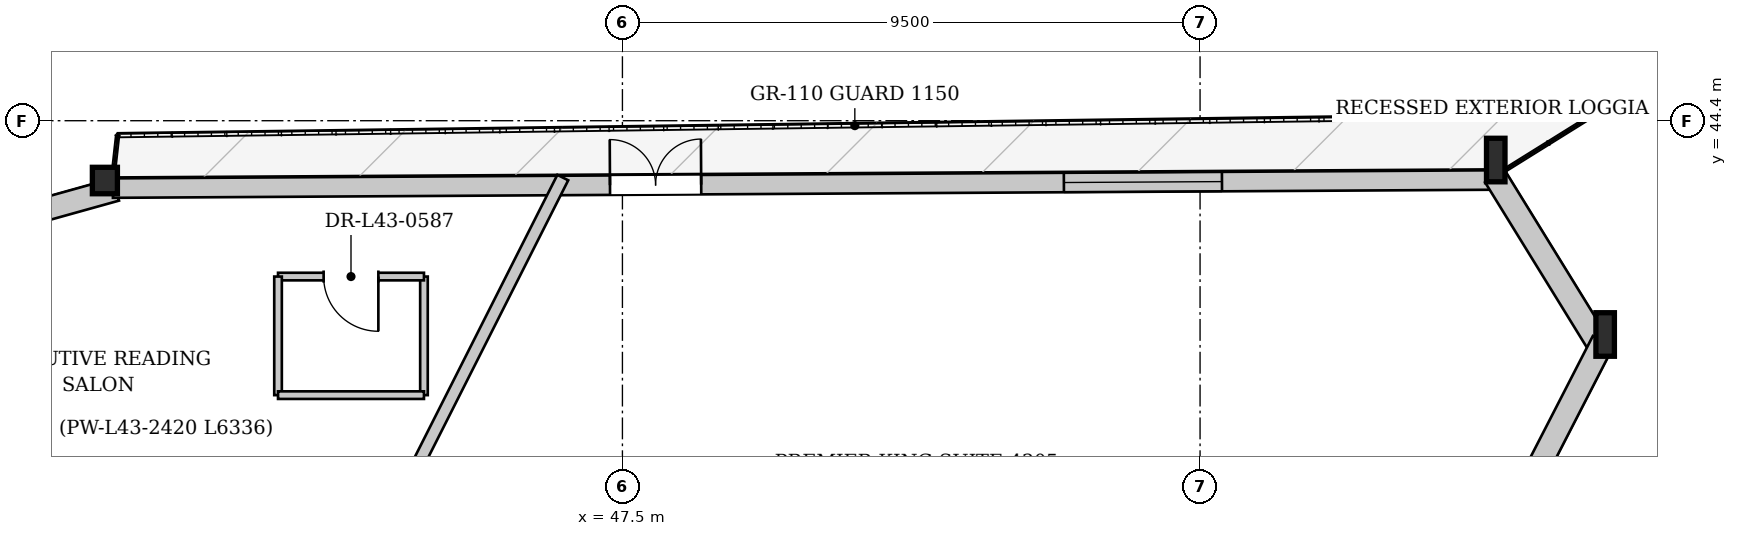
"""IFC4 building model, lengths in metres.
Left out: names, types, materials, properties, quantities, classifications, styles, units other than length and angle.
Written with IfcOpenShell. Run it as: python <this file> out.ifc"""

import sys

from ifc_helpers import new_model, si_unit, direction, frame, frame_2d, origin, origin_2d, place, context, subcontext, project, spatial, rectangle, i_section, extrude, source, transform, mapped, element, fill, save


model = new_model("IFC4")
c1 = context("Model", 3, precision=1e-05, world=origin(), true_north=direction((0.0, 1.0)))
c2 = subcontext(c1, "Body", "Model", "MODEL_VIEW")
j1 = project(units=[si_unit("LENGTHUNIT", "METRE"), si_unit("PLANEANGLEUNIT", "RADIAN")], contexts=[c1])
p1 = place(None, origin())
s1 = spatial("IfcSite", under=j1, at=p1, CompositionType="ELEMENT")
p2 = place(p1, origin())
s2 = spatial("IfcBuilding", under=s1, at=p2, CompositionType="ELEMENT")
p3 = place(p2, frame((0.0, 0.0, 164.35)))
s3 = spatial("IfcBuildingStorey", under=s2, at=p3, CompositionType="ELEMENT", Elevation=164.35)
m1 = source(origin(), c2, "Body", "SweptSolid", [
    extrude(i_section(OverallWidth=0.304, OverallDepth=0.716, WebThickness=0.021, FlangeThickness=0.04, at=origin_2d()), origin(), (0.0, 0.0, 1.0), 3.419),
])
p4 = place(p3, frame((63.798, 40.687, 0.0), z_axis=(-0.079478787874, 0.115754820435, 0.990092896563), x_axis=(-0.824383065971, -0.566032296376, 0.0)))
e1 = element("IfcColumn", 1, at=p4, inside=s3, PredefinedType="COLUMN", context=c2, shape_type="MappedRepresentation", body=[
    mapped(m1, transform((0.0, 0.0, 0.0), x_axis=(1.0, 0.0, 0.0), y_axis=(0.0, 1.0, 0.0), z_axis=(0.0, 0.0, 1.0), scale=1.0)),
])
m2 = source(origin(), c2, "Body", "SweptSolid", [
    extrude(i_section(OverallWidth=0.304, OverallDepth=0.716, WebThickness=0.021, FlangeThickness=0.04, at=origin_2d()), origin(), (0.0, 0.0, 1.0), 3.415),
])
p5 = place(p3, frame((62.011, 43.586, 0.0), z_axis=(-0.086804146839, 0.098101556395, 0.991383439807), x_axis=(-0.748913206075, -0.662668099253, 0.0)))
e2 = element("IfcColumn", 2, at=p5, inside=s3, PredefinedType="COLUMN", context=c2, shape_type="MappedRepresentation", body=[
    mapped(m2, transform((0.0, 0.0, 0.0), x_axis=(1.0, 0.0, 0.0), y_axis=(0.0, 1.0, 0.0), z_axis=(0.0, 0.0, 1.0), scale=1.0)),
])
m3 = source(origin(), c2, "Body", "SweptSolid", [
    extrude(i_section(OverallWidth=0.412, OverallDepth=0.435, WebThickness=0.031, FlangeThickness=0.05, at=origin_2d()), origin(), (0.0, 0.0, 1.0), 3.396),
])
p6 = place(p3, frame((39.119, 43.452, 0.0), z_axis=(-0.076712698826, -0.020921645134, 0.996833710608), x_axis=(0.263117405792, -0.964763821238, 0.0)))
e3 = element("IfcColumn", 3, at=p6, inside=s3, PredefinedType="COLUMN", context=c2, shape_type="MappedRepresentation", body=[
    mapped(m3, transform((0.0, 0.0, 0.0), x_axis=(1.0, 0.0, 0.0), y_axis=(0.0, 1.0, 0.0), z_axis=(0.0, 0.0, 1.0), scale=1.0)),
])
p7 = place(p3, frame((17.117, 37.123, 0.0), z_axis=(0.0, 0.0, 1.0), x_axis=(0.963294352917, 0.268447368468, 0.0)))
e4 = element("IfcWall", 4, at=p7, inside=s3, PredefinedType="SOLIDWALL", context=c2, shape_type="SweptSolid", body=[
    extrude(rectangle(XDim=22.893, YDim=0.38, at=frame_2d((11.446, 0.0))), origin(), (0.0, 0.0, 1.0), 2.722),
])
p8 = place(p7, frame((5.31, 0.0, 0.352)))
e5 = element("IfcOpeningElement", 5, at=p8, cuts=e4, PredefinedType="OPENING", context=c2, shape_type="SweptSolid", body=[
    extrude(rectangle(XDim=2.2, YDim=2.25, at=frame_2d((1.1, 1.125))), frame((0.0, 0.2, 0.0), z_axis=(0.0, -1.0, 0.0), x_axis=(1.0, 0.0, 0.0)), (0.0, 0.0, 1.0), 0.4),
])
p9 = place(p7, frame((15.383, 0.0, 0.352)))
e6 = element("IfcOpeningElement", 6, at=p9, cuts=e4, PredefinedType="OPENING", context=c2, shape_type="SweptSolid", body=[
    extrude(rectangle(XDim=2.2, YDim=2.25, at=frame_2d((1.1, 1.125))), frame((0.0, 0.2, 0.0), z_axis=(0.0, -1.0, 0.0), x_axis=(1.0, 0.0, 0.0)), (0.0, 0.0, 1.0), 0.4),
])
p10 = place(p3, frame((39.12, 43.292, 0.0), z_axis=(0.0, 0.0, 1.0), x_axis=(0.999982860289, 0.005854837953, 0.0)))
e7 = element("IfcWall", 7, at=p10, inside=s3, PredefinedType="SOLIDWALL", context=c2, shape_type="SweptSolid", body=[
    extrude(rectangle(XDim=22.893, YDim=0.32, at=frame_2d((11.446, 0.0))), origin(), (0.0, 0.0, 1.0), 2.722),
])
p11 = place(p10, frame((8.176, 0.0, 0.0)))
e8 = element("IfcOpeningElement", 8, at=p11, cuts=e7, PredefinedType="OPENING", context=c2, shape_type="SweptSolid", body=[
    extrude(rectangle(XDim=1.5, YDim=2.3, at=frame_2d((0.75, 1.15))), frame((0.0, 0.17, 0.0), z_axis=(0.0, -1.0, 0.0), x_axis=(1.0, 0.0, 0.0)), (0.0, 0.0, 1.0), 0.34),
])
p12 = place(p10, frame((15.641, 0.0, 0.252)))
e9 = element("IfcOpeningElement", 9, at=p12, cuts=e7, PredefinedType="OPENING", context=c2, shape_type="SweptSolid", body=[
    extrude(rectangle(XDim=2.6, YDim=2.35, at=frame_2d((1.3, 1.175))), frame((0.0, 0.17, 0.0), z_axis=(0.0, -1.0, 0.0), x_axis=(1.0, 0.0, 0.0)), (0.0, 0.0, 1.0), 0.34),
])
p13 = place(p3, frame((61.849, 43.486, 0.0), z_axis=(0.0, 0.0, 1.0), x_axis=(0.524789160116, -0.851232246467, 0.0)))
e10 = element("IfcWall", 10, at=p13, inside=s3, PredefinedType="SOLIDWALL", context=c2, shape_type="SweptSolid", body=[
    extrude(rectangle(XDim=3.406, YDim=0.38, at=frame_2d((1.703, 0.0))), origin(), (0.0, 0.0, 1.0), 2.722),
])
p14 = place(p3, frame((63.629, 40.773, 0.0), z_axis=(0.0, 0.0, 1.0), x_axis=(-0.457435909199, -0.889242592871, 0.0)))
e11 = element("IfcWall", 11, at=p14, inside=s3, PredefinedType="SOLIDWALL", context=c2, shape_type="SweptSolid", body=[
    extrude(rectangle(XDim=23.472, YDim=0.38, at=frame_2d((11.736, 0.0))), origin(), (0.0, 0.0, 1.0), 2.722),
])
p15 = place(p14, frame((7.072, 0.0, 0.352)))
e12 = element("IfcOpeningElement", 12, at=p15, cuts=e11, PredefinedType="OPENING", context=c2, shape_type="SweptSolid", body=[
    extrude(rectangle(XDim=2.2, YDim=2.25, at=frame_2d((1.1, 1.125))), frame((0.0, 0.2, 0.0), z_axis=(0.0, -1.0, 0.0), x_axis=(1.0, 0.0, 0.0)), (0.0, 0.0, 1.0), 0.4),
])
p16 = place(p14, frame((15.8, 0.0, 0.352)))
e13 = element("IfcOpeningElement", 13, at=p16, cuts=e11, PredefinedType="OPENING", context=c2, shape_type="SweptSolid", body=[
    extrude(rectangle(XDim=2.2, YDim=2.25, at=frame_2d((1.1, 1.125))), frame((0.0, 0.2, 0.0), z_axis=(0.0, -1.0, 0.0), x_axis=(1.0, 0.0, 0.0)), (0.0, 0.0, 1.0), 0.4),
])
p17 = place(p3, frame((41.864, 34.25, 0.0), z_axis=(0.0, 0.0, 1.0), x_axis=(0.450889382552, 0.892579836598, 0.0)))
e14 = element("IfcWall", 14, at=p17, inside=s3, PredefinedType="PARTITIONING", context=c2, shape_type="SweptSolid", body=[
    extrude(rectangle(XDim=10.324, YDim=0.2, at=frame_2d((5.162, 0.0))), origin(), (0.0, 0.0, 1.0), 3.33),
])
p18 = place(p3, frame((44.236, 39.887, 0.0), z_axis=(0.0, 0.0, 1.0), x_axis=(0.0, 1.0, 0.0)))
e15 = element("IfcWall", 15, at=p18, inside=s3, PredefinedType="PARTITIONING", context=c2, shape_type="SweptSolid", body=[
    extrude(rectangle(XDim=1.95, YDim=0.125, at=frame_2d((0.975, 0.0))), origin(), (0.0, 0.0, 1.0), 3.33),
])
p19 = place(p3, frame((44.236, 41.837, 0.0), z_axis=(0.0, 0.0, 1.0), x_axis=(-1.0, 0.0, 0.0)))
e16 = element("IfcWall", 16, at=p19, inside=s3, PredefinedType="PARTITIONING", context=c2, shape_type="SweptSolid", body=[
    extrude(rectangle(XDim=2.4, YDim=0.125, at=frame_2d((1.2, 0.0))), origin(), (0.0, 0.0, 1.0), 3.33),
])
p20 = place(p19, frame((0.75, 0.0, 0.0)))
e17 = element("IfcOpeningElement", 17, at=p20, cuts=e16, PredefinedType="OPENING", context=c2, shape_type="SweptSolid", body=[
    extrude(rectangle(XDim=0.9, YDim=2.1, at=frame_2d((0.45, 1.05))), frame((0.0, 0.073, 0.0), z_axis=(0.0, -1.0, 0.0), x_axis=(1.0, 0.0, 0.0)), (0.0, 0.0, 1.0), 0.145),
])
p21 = place(p3, frame((41.836, 41.837, 0.0), z_axis=(0.0, 0.0, 1.0), x_axis=(0.0, -1.0, 0.0)))
e18 = element("IfcWall", 18, at=p21, inside=s3, PredefinedType="PARTITIONING", context=c2, shape_type="SweptSolid", body=[
    extrude(rectangle(XDim=1.95, YDim=0.125, at=frame_2d((0.975, 0.0))), origin(), (0.0, 0.0, 1.0), 3.33),
])
p22 = place(p3, frame((41.836, 39.887, 0.0), z_axis=(0.0, 0.0, 1.0), x_axis=(1.0, 0.0, 0.0)))
e19 = element("IfcWall", 19, at=p22, inside=s3, PredefinedType="PARTITIONING", context=c2, shape_type="SweptSolid", body=[
    extrude(rectangle(XDim=2.4, YDim=0.125, at=frame_2d((1.2, 0.0))), origin(), (0.0, 0.0, 1.0), 3.015),
])
m4 = source(origin(), c2, "Body", "SweptSolid", [
    extrude(rectangle(XDim=1.5, YDim=2.3, at=frame_2d((0.75, 1.15))), frame((0.0, 0.025, 0.0), z_axis=(0.0, -1.0, 0.0), x_axis=(1.0, 0.0, 0.0)), (0.0, 0.0, 1.0), 0.05),
])
p23 = place(p11, origin())
e20 = element("IfcDoor", 20, at=p23, inside=s3, OperationType="DOUBLE_DOOR_SINGLE_SWING", PredefinedType="DOOR", context=c2, shape_type="MappedRepresentation", body=[
    mapped(m4, transform((0.0, 0.0, 0.0), x_axis=(1.0, 0.0, 0.0), y_axis=(0.0, 1.0, 0.0), z_axis=(0.0, 0.0, 1.0), scale=1.0)),
])
fill(e8, e20)
m5 = source(origin(), c2, "Body", "SweptSolid", [
    extrude(rectangle(XDim=2.6, YDim=2.35, at=frame_2d((1.3, 1.175))), frame((0.0, 0.03, 0.0), z_axis=(0.0, -1.0, 0.0), x_axis=(1.0, 0.0, 0.0)), (0.0, 0.0, 1.0), 0.06),
])
p24 = place(p12, origin())
e21 = element("IfcWindow", 21, at=p24, inside=s3, PartitioningType="SINGLE_PANEL", PredefinedType="WINDOW", context=c2, shape_type="MappedRepresentation", body=[
    mapped(m5, transform((0.0, 0.0, 0.0), x_axis=(1.0, 0.0, 0.0), y_axis=(0.0, 1.0, 0.0), z_axis=(0.0, 0.0, 1.0), scale=1.0)),
])
fill(e9, e21)
m6 = source(origin(), c2, "Body", "SweptSolid", [
    extrude(rectangle(XDim=0.9, YDim=2.1, at=frame_2d((0.45, 1.05))), frame((0.0, 0.025, 0.0), z_axis=(0.0, -1.0, 0.0), x_axis=(1.0, 0.0, 0.0)), (0.0, 0.0, 1.0), 0.05),
])
p25 = place(p20, origin())
e22 = element("IfcDoor", 22, at=p25, inside=s3, OperationType="SINGLE_SWING_LEFT", PredefinedType="DOOR", context=c2, shape_type="MappedRepresentation", body=[
    mapped(m6, transform((0.0, 0.0, 0.0), x_axis=(1.0, 0.0, 0.0), y_axis=(0.0, 1.0, 0.0), z_axis=(0.0, 0.0, 1.0), scale=1.0)),
])
fill(e17, e22)
save(model, sys.argv[1])
